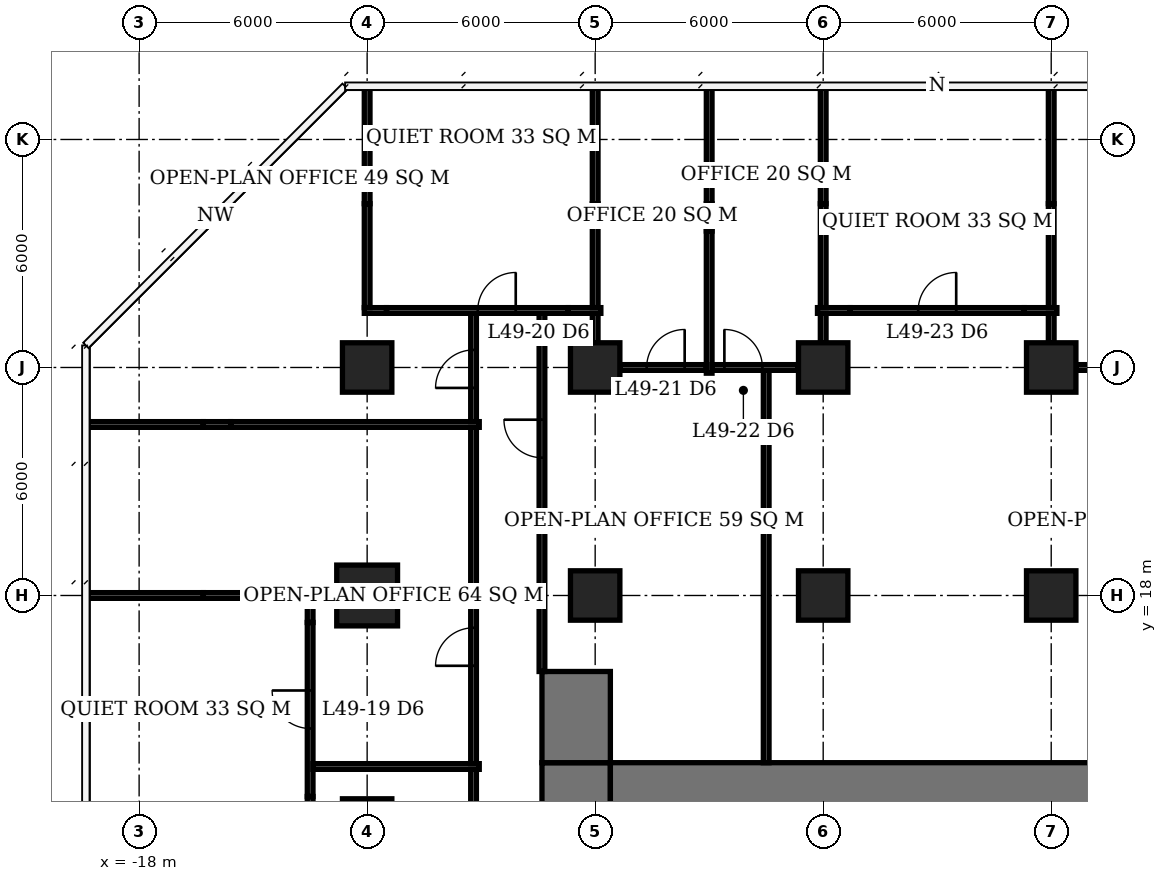
"""IFC4 building model, lengths in metres.
Left out: names, types, materials, properties, quantities, classifications, styles, units other than length and angle.
Written with IfcOpenShell. Run it as: python <this file> out.ifc"""

import sys

from ifc_helpers import new_model, si_unit, direction, frame, frame_2d, origin, origin_2d, place, context, subcontext, project, spatial, rectangle, extrude, element, fill, save


model = new_model("IFC4")
c1 = context("Model", 3, precision=1e-05, world=origin(), true_north=direction((0.0, 1.0)))
c2 = subcontext(c1, "Body", "Model", "MODEL_VIEW")
j1 = project(units=[si_unit("LENGTHUNIT", "METRE"), si_unit("PLANEANGLEUNIT", "RADIAN")], contexts=[c1])
p1 = place(None, origin())
s1 = spatial("IfcSite", under=j1, at=p1, CompositionType="ELEMENT")
p2 = place(p1, origin())
s2 = spatial("IfcBuilding", under=s1, at=p2, CompositionType="ELEMENT")
p3 = place(p2, frame((0.0, 0.0, 200.6)))
s3 = spatial("IfcBuildingStorey", under=s2, at=p3, CompositionType="ELEMENT", Elevation=200.6)
p4 = place(p3, frame((-12.0, 12.0, 0.0), z_axis=(0.0, 0.0, 1.0), x_axis=(1.0, 0.0, 0.0)))
e1 = element("IfcColumn", 1, at=p4, inside=s3, PredefinedType="COLUMN", context=c2, shape_type="SweptSolid", body=[
    extrude(rectangle(XDim=1.3, YDim=1.3, at=origin_2d()), origin(), (0.0, 0.0, 1.0), 3.9),
])
p5 = place(p3, frame((-12.0, 18.0, 0.0), z_axis=(0.0, 0.0, 1.0), x_axis=(1.0, 0.0, 0.0)))
e2 = element("IfcColumn", 2, at=p5, inside=s3, PredefinedType="COLUMN", context=c2, shape_type="SweptSolid", body=[
    extrude(rectangle(XDim=1.6, YDim=1.6, at=origin_2d()), origin(), (0.0, 0.0, 1.0), 3.9),
])
for number, where, z_axis, x_axis in (
    (3, (-12.0, 24.0, 0.0), (0.0, 0.0, 1.0), (1.0, 0.0, 0.0)),
    (4, (-6.0, 18.0, 0.0), (0.0, 0.0, 1.0), (1.0, 0.0, 0.0)),
    (5, (-6.0, 24.0, 0.0), (0.0, 0.0, 1.0), (1.0, 0.0, 0.0)),
    (6, (0.0, 18.0, 0.0), (0.0, 0.0, 1.0), (1.0, 0.0, 0.0)),
    (7, (0.0, 24.0, 0.0), (0.0, 0.0, 1.0), (1.0, 0.0, 0.0)),
    (8, (6.0, 18.0, 0.0), (0.0, 0.0, 1.0), (1.0, 0.0, 0.0)),
    (9, (6.0, 24.0, 0.0), (0.0, 0.0, 1.0), (1.0, 0.0, 0.0)),
):
    element("IfcColumn", number, at=place(p3, frame(where, z_axis=z_axis, x_axis=x_axis)), inside=s3, PredefinedType="COLUMN", context=c2, shape_type="SweptSolid", body=[
        extrude(rectangle(XDim=1.3, YDim=1.3, at=origin_2d()), origin(), (0.0, 0.0, 1.0), 3.9),
    ])
p6 = place(p3, frame((-5.6, 12.6, 0.0), z_axis=(0.0, 0.0, 1.0), x_axis=(1.0, 0.0, 0.0)))
e10 = element("IfcWall", 10, at=p6, inside=s3, PredefinedType="SHEAR", context=c2, shape_type="SweptSolid", body=[
    extrude(rectangle(XDim=23.2, YDim=2.0, at=frame_2d((11.6, 0.0))), origin(), (0.0, 0.0, 1.0), 3.9),
])
p7 = place(p3, frame((-6.5, -7.6, 0.0), z_axis=(0.0, 0.0, 1.0), x_axis=(0.0, 1.0, 0.0)))
e11 = element("IfcWall", 11, at=p7, inside=s3, PredefinedType="SHEAR", context=c2, shape_type="SweptSolid", body=[
    extrude(rectangle(XDim=21.2, YDim=1.8, at=frame_2d((10.6, 0.0))), origin(), (0.0, 0.0, 1.0), 3.9),
])
p8 = place(p7, frame((7.8, 0.0, 0.0)))
e12 = element("IfcOpeningElement", 12, at=p8, cuts=e11, PredefinedType="OPENING", context=c2, shape_type="SweptSolid", body=[
    extrude(rectangle(XDim=1.8, YDim=2.4, at=frame_2d((0.9, 1.2))), frame((0.0, 0.91, 0.0), z_axis=(0.0, -1.0, 0.0), x_axis=(1.0, 0.0, 0.0)), (0.0, 0.0, 1.0), 1.82),
])
p9 = place(p3, frame((-6.5, 13.6, 0.0), z_axis=(0.0, 0.0, 1.0), x_axis=(0.0, 1.0, 0.0)))
e13 = element("IfcWall", 13, at=p9, inside=s3, PredefinedType="SHEAR", context=c2, shape_type="SweptSolid", body=[
    extrude(rectangle(XDim=2.4, YDim=1.8, at=frame_2d((1.2, 0.0))), origin(), (0.0, 0.0, 1.0), 3.9),
])
p10 = place(p3, frame((-19.4, 18.0, 0.0), z_axis=(0.0, 0.0, 1.0), x_axis=(1.0, 0.0, 0.0)))
e14 = element("IfcWall", 14, at=p10, inside=s3, PredefinedType="PARTITIONING", context=c2, shape_type="SweptSolid", body=[
    extrude(rectangle(XDim=3.09, YDim=0.15, at=frame_2d((1.545, 0.0))), origin(), (0.0, 0.0, 1.0), 3.65),
])
p11 = place(p3, frame((-16.31, 18.0, 0.0), z_axis=(0.0, 0.0, 1.0), x_axis=(1.0, 0.0, 0.0)))
e15 = element("IfcWall", 15, at=p11, inside=s3, PredefinedType="PARTITIONING", context=c2, shape_type="SweptSolid", body=[
    extrude(rectangle(XDim=2.885, YDim=0.15, at=frame_2d((1.442, 0.0))), origin(), (0.0, 0.0, 1.0), 2.65),
])
p12 = place(p3, frame((-5.34, 24.0, 0.0), z_axis=(0.0, 0.0, 1.0), x_axis=(1.0, 0.0, 0.0)))
e16 = element("IfcWall", 16, at=p12, inside=s3, PredefinedType="PARTITIONING", context=c2, shape_type="SweptSolid", body=[
    extrude(rectangle(XDim=2.265, YDim=0.15, at=frame_2d((1.133, 0.0))), origin(), (0.0, 0.0, 1.0), 3.65),
])
p13 = place(p12, frame((0.695, 0.0, 0.0)))
e17 = element("IfcOpeningElement", 17, at=p13, cuts=e16, PredefinedType="OPENING", context=c2, shape_type="SweptSolid", body=[
    extrude(rectangle(XDim=1.0, YDim=2.1, at=frame_2d((0.5, 1.05))), frame((0.0, 0.085, 0.0), z_axis=(0.0, -1.0, 0.0), x_axis=(1.0, 0.0, 0.0)), (0.0, 0.0, 1.0), 0.17),
])
p14 = place(p3, frame((-2.925, 24.0, 0.0), z_axis=(0.0, 0.0, 1.0), x_axis=(1.0, 0.0, 0.0)))
e18 = element("IfcWall", 18, at=p14, inside=s3, PredefinedType="PARTITIONING", context=c2, shape_type="SweptSolid", body=[
    extrude(rectangle(XDim=2.265, YDim=0.15, at=frame_2d((1.133, 0.0))), origin(), (0.0, 0.0, 1.0), 3.65),
])
p15 = place(p14, frame((0.325, 0.0, 0.0)))
e19 = element("IfcOpeningElement", 19, at=p15, cuts=e18, PredefinedType="OPENING", context=c2, shape_type="SweptSolid", body=[
    extrude(rectangle(XDim=1.0, YDim=2.1, at=frame_2d((0.5, 1.05))), frame((0.0, 0.085, 0.0), z_axis=(0.0, -1.0, 0.0), x_axis=(1.0, 0.0, 0.0)), (0.0, 0.0, 1.0), 0.17),
])
p16 = place(p3, frame((6.66, 24.0, 0.0), z_axis=(0.0, 0.0, 1.0), x_axis=(1.0, 0.0, 0.0)))
e20 = element("IfcWall", 20, at=p16, inside=s3, PredefinedType="PARTITIONING", context=c2, shape_type="SweptSolid", body=[
    extrude(rectangle(XDim=4.68, YDim=0.15, at=frame_2d((2.34, 0.0))), origin(), (0.0, 0.0, 1.0), 3.65),
])
p17 = place(p16, frame((1.84, 0.0, 0.0)))
e21 = element("IfcOpeningElement", 21, at=p17, cuts=e20, PredefinedType="OPENING", context=c2, shape_type="SweptSolid", body=[
    extrude(rectangle(XDim=1.0, YDim=2.1, at=frame_2d((0.5, 1.05))), frame((0.0, 0.085, 0.0), z_axis=(0.0, -1.0, 0.0), x_axis=(1.0, 0.0, 0.0)), (0.0, 0.0, 1.0), 0.17),
])
p18 = place(p3, frame((-12.075, 25.5, 0.0), z_axis=(0.0, 0.0, 1.0), x_axis=(1.0, 0.0, 0.0)))
e22 = element("IfcWall", 22, at=p18, inside=s3, PredefinedType="PARTITIONING", context=c2, shape_type="SweptSolid", body=[
    extrude(rectangle(XDim=0.585, YDim=0.15, at=frame_2d((0.292, 0.0))), origin(), (0.0, 0.0, 1.0), 2.65),
])
p19 = place(p3, frame((-11.49, 25.5, 0.0), z_axis=(0.0, 0.0, 1.0), x_axis=(1.0, 0.0, 0.0)))
e23 = element("IfcWall", 23, at=p19, inside=s3, PredefinedType="PARTITIONING", context=c2, shape_type="SweptSolid", body=[
    extrude(rectangle(XDim=4.78, YDim=0.15, at=frame_2d((2.39, 0.0))), origin(), (0.0, 0.0, 1.0), 3.65),
])
p20 = place(p19, frame((2.4, 0.0, 0.0)))
e24 = element("IfcOpeningElement", 24, at=p20, cuts=e23, PredefinedType="OPENING", context=c2, shape_type="SweptSolid", body=[
    extrude(rectangle(XDim=1.0, YDim=2.1, at=frame_2d((0.5, 1.05))), frame((0.0, 0.085, 0.0), z_axis=(0.0, -1.0, 0.0), x_axis=(1.0, 0.0, 0.0)), (0.0, 0.0, 1.0), 0.17),
])
for number, where, z_axis, x_axis in (
    (25, (-6.71, 25.5, 0.0), (0.0, 0.0, 1.0), (1.0, 0.0, 0.0)),
    (26, (-0.15, 25.5, 0.0), (0.0, 0.0, 1.0), (1.0, 0.0, 0.0)),
):
    element("IfcWall", number, at=place(p3, frame(where, z_axis=z_axis, x_axis=x_axis)), inside=s3, PredefinedType="PARTITIONING", context=c2, shape_type="SweptSolid", body=[
        extrude(rectangle(XDim=0.86, YDim=0.15, at=frame_2d((0.43, 0.0))), origin(), (0.0, 0.0, 1.0), 2.65),
    ])
p21 = place(p3, frame((0.71, 25.5, 0.0), z_axis=(0.0, 0.0, 1.0), x_axis=(1.0, 0.0, 0.0)))
e27 = element("IfcWall", 27, at=p21, inside=s3, PredefinedType="PARTITIONING", context=c2, shape_type="SweptSolid", body=[
    extrude(rectangle(XDim=4.58, YDim=0.15, at=frame_2d((2.29, 0.0))), origin(), (0.0, 0.0, 1.0), 3.65),
])
p22 = place(p21, frame((1.79, 0.0, 0.0)))
e28 = element("IfcOpeningElement", 28, at=p22, cuts=e27, PredefinedType="OPENING", context=c2, shape_type="SweptSolid", body=[
    extrude(rectangle(XDim=1.0, YDim=2.1, at=frame_2d((0.5, 1.05))), frame((0.0, 0.085, 0.0), z_axis=(0.0, -1.0, 0.0), x_axis=(1.0, 0.0, 0.0)), (0.0, 0.0, 1.0), 0.17),
])
p23 = place(p3, frame((5.29, 25.5, 0.0), z_axis=(0.0, 0.0, 1.0), x_axis=(1.0, 0.0, 0.0)))
e29 = element("IfcWall", 29, at=p23, inside=s3, PredefinedType="PARTITIONING", context=c2, shape_type="SweptSolid", body=[
    extrude(rectangle(XDim=0.86, YDim=0.15, at=frame_2d((0.43, 0.0))), origin(), (0.0, 0.0, 1.0), 2.65),
])
p24 = place(p3, frame((-13.5, 12.075, 0.0), z_axis=(0.0, 0.0, 1.0), x_axis=(0.0, 1.0, 0.0)))
e30 = element("IfcWall", 30, at=p24, inside=s3, PredefinedType="PARTITIONING", context=c2, shape_type="SweptSolid", body=[
    extrude(rectangle(XDim=0.635, YDim=0.15, at=frame_2d((0.317, 0.0))), origin(), (0.0, 0.0, 1.0), 2.65),
])
p25 = place(p3, frame((-13.5, 12.71, 0.0), z_axis=(0.0, 0.0, 1.0), x_axis=(0.0, 1.0, 0.0)))
e31 = element("IfcWall", 31, at=p25, inside=s3, PredefinedType="PARTITIONING", context=c2, shape_type="SweptSolid", body=[
    extrude(rectangle(XDim=4.58, YDim=0.15, at=frame_2d((2.29, 0.0))), origin(), (0.0, 0.0, 1.0), 3.65),
])
p26 = place(p25, frame((1.79, 0.0, 0.0)))
e32 = element("IfcOpeningElement", 32, at=p26, cuts=e31, PredefinedType="OPENING", context=c2, shape_type="SweptSolid", body=[
    extrude(rectangle(XDim=1.0, YDim=2.1, at=frame_2d((0.5, 1.05))), frame((0.0, 0.085, 0.0), z_axis=(0.0, -1.0, 0.0), x_axis=(1.0, 0.0, 0.0)), (0.0, 0.0, 1.0), 0.17),
])
p27 = place(p3, frame((-13.5, 17.29, 0.0), z_axis=(0.0, 0.0, 1.0), x_axis=(0.0, 1.0, 0.0)))
e33 = element("IfcWall", 33, at=p27, inside=s3, PredefinedType="PARTITIONING", context=c2, shape_type="SweptSolid", body=[
    extrude(rectangle(XDim=0.635, YDim=0.15, at=frame_2d((0.317, 0.0))), origin(), (0.0, 0.0, 1.0), 2.65),
])
p28 = place(p3, frame((-12.0, 25.575, 0.0), z_axis=(0.0, 0.0, 1.0), x_axis=(0.0, 1.0, 0.0)))
e34 = element("IfcWall", 34, at=p28, inside=s3, PredefinedType="PARTITIONING", context=c2, shape_type="SweptSolid", body=[
    extrude(rectangle(XDim=2.735, YDim=0.15, at=frame_2d((1.368, 0.0))), origin(), (0.0, 0.0, 1.0), 2.65),
])
p29 = place(p3, frame((-12.0, 28.31, 0.0), z_axis=(0.0, 0.0, 1.0), x_axis=(0.0, 1.0, 0.0)))
e35 = element("IfcWall", 35, at=p29, inside=s3, PredefinedType="PARTITIONING", context=c2, shape_type="SweptSolid", body=[
    extrude(rectangle(XDim=3.09, YDim=0.15, at=frame_2d((1.545, 0.0))), origin(), (0.0, 0.0, 1.0), 3.65),
])
p30 = place(p3, frame((-6.0, 24.65, 0.0), z_axis=(0.0, 0.0, 1.0), x_axis=(0.0, 1.0, 0.0)))
e36 = element("IfcWall", 36, at=p30, inside=s3, PredefinedType="PARTITIONING", context=c2, shape_type="SweptSolid", body=[
    extrude(rectangle(XDim=0.775, YDim=0.15, at=frame_2d((0.388, 0.0))), origin(), (0.0, 0.0, 1.0), 2.65),
])
p31 = place(p3, frame((-6.0, 25.575, 0.0), z_axis=(0.0, 0.0, 1.0), x_axis=(0.0, 1.0, 0.0)))
e37 = element("IfcWall", 37, at=p31, inside=s3, PredefinedType="PARTITIONING", context=c2, shape_type="SweptSolid", body=[
    extrude(rectangle(XDim=2.735, YDim=0.15, at=frame_2d((1.368, 0.0))), origin(), (0.0, 0.0, 1.0), 2.65),
])
p32 = place(p3, frame((-6.0, 28.31, 0.0), z_axis=(0.0, 0.0, 1.0), x_axis=(0.0, 1.0, 0.0)))
e38 = element("IfcWall", 38, at=p32, inside=s3, PredefinedType="PARTITIONING", context=c2, shape_type="SweptSolid", body=[
    extrude(rectangle(XDim=3.09, YDim=0.15, at=frame_2d((1.545, 0.0))), origin(), (0.0, 0.0, 1.0), 3.65),
])
p33 = place(p3, frame((-3.0, 23.85, 0.0), z_axis=(0.0, 0.0, 1.0), x_axis=(0.0, 1.0, 0.0)))
e39 = element("IfcWall", 39, at=p33, inside=s3, PredefinedType="PARTITIONING", context=c2, shape_type="SweptSolid", body=[
    extrude(rectangle(XDim=3.74, YDim=0.15, at=frame_2d((1.87, 0.0))), origin(), (0.0, 0.0, 1.0), 3.65),
])
p34 = place(p3, frame((-3.0, 27.59, 0.0), z_axis=(0.0, 0.0, 1.0), x_axis=(0.0, 1.0, 0.0)))
e40 = element("IfcWall", 40, at=p34, inside=s3, PredefinedType="PARTITIONING", context=c2, shape_type="SweptSolid", body=[
    extrude(rectangle(XDim=0.72, YDim=0.15, at=frame_2d((0.36, 0.0))), origin(), (0.0, 0.0, 1.0), 2.65),
])
p35 = place(p3, frame((-3.0, 28.31, 0.0), z_axis=(0.0, 0.0, 1.0), x_axis=(0.0, 1.0, 0.0)))
e41 = element("IfcWall", 41, at=p35, inside=s3, PredefinedType="PARTITIONING", context=c2, shape_type="SweptSolid", body=[
    extrude(rectangle(XDim=3.09, YDim=0.15, at=frame_2d((1.545, 0.0))), origin(), (0.0, 0.0, 1.0), 3.65),
])
p36 = place(p3, frame((0.0, 24.65, 0.0), z_axis=(0.0, 0.0, 1.0), x_axis=(0.0, 1.0, 0.0)))
e42 = element("IfcWall", 42, at=p36, inside=s3, PredefinedType="PARTITIONING", context=c2, shape_type="SweptSolid", body=[
    extrude(rectangle(XDim=0.775, YDim=0.15, at=frame_2d((0.388, 0.0))), origin(), (0.0, 0.0, 1.0), 2.65),
])
p37 = place(p3, frame((0.0, 25.575, 0.0), z_axis=(0.0, 0.0, 1.0), x_axis=(0.0, 1.0, 0.0)))
e43 = element("IfcWall", 43, at=p37, inside=s3, PredefinedType="PARTITIONING", context=c2, shape_type="SweptSolid", body=[
    extrude(rectangle(XDim=2.735, YDim=0.15, at=frame_2d((1.368, 0.0))), origin(), (0.0, 0.0, 1.0), 2.65),
])
p38 = place(p3, frame((0.0, 28.31, 0.0), z_axis=(0.0, 0.0, 1.0), x_axis=(0.0, 1.0, 0.0)))
e44 = element("IfcWall", 44, at=p38, inside=s3, PredefinedType="PARTITIONING", context=c2, shape_type="SweptSolid", body=[
    extrude(rectangle(XDim=3.04, YDim=0.15, at=frame_2d((1.52, 0.0))), origin(), (0.0, 0.0, 1.0), 3.65),
])
p39 = place(p3, frame((6.0, 24.65, 0.0), z_axis=(0.0, 0.0, 1.0), x_axis=(0.0, 1.0, 0.0)))
e45 = element("IfcWall", 45, at=p39, inside=s3, PredefinedType="PARTITIONING", context=c2, shape_type="SweptSolid", body=[
    extrude(rectangle(XDim=0.775, YDim=0.15, at=frame_2d((0.388, 0.0))), origin(), (0.0, 0.0, 1.0), 2.65),
])
p40 = place(p3, frame((6.0, 25.575, 0.0), z_axis=(0.0, 0.0, 1.0), x_axis=(0.0, 1.0, 0.0)))
e46 = element("IfcWall", 46, at=p40, inside=s3, PredefinedType="PARTITIONING", context=c2, shape_type="SweptSolid", body=[
    extrude(rectangle(XDim=2.735, YDim=0.15, at=frame_2d((1.368, 0.0))), origin(), (0.0, 0.0, 1.0), 2.65),
])
p41 = place(p3, frame((6.0, 28.31, 0.0), z_axis=(0.0, 0.0, 1.0), x_axis=(0.0, 1.0, 0.0)))
e47 = element("IfcWall", 47, at=p41, inside=s3, PredefinedType="PARTITIONING", context=c2, shape_type="SweptSolid", body=[
    extrude(rectangle(XDim=3.04, YDim=0.15, at=frame_2d((1.52, 0.0))), origin(), (0.0, 0.0, 1.0), 3.65),
])
p42 = place(p3, frame((-19.4, 22.5, 0.0), z_axis=(0.0, 0.0, 1.0), x_axis=(1.0, 0.0, 0.0)))
e48 = element("IfcWall", 48, at=p42, inside=s3, PredefinedType="PARTITIONING", context=c2, shape_type="SweptSolid", body=[
    extrude(rectangle(XDim=3.09, YDim=0.15, at=frame_2d((1.545, 0.0))), origin(), (0.0, 0.0, 1.0), 3.65),
])
p43 = place(p3, frame((-16.31, 22.5, 0.0), z_axis=(0.0, 0.0, 1.0), x_axis=(1.0, 0.0, 0.0)))
e49 = element("IfcWall", 49, at=p43, inside=s3, PredefinedType="PARTITIONING", context=c2, shape_type="SweptSolid", body=[
    extrude(rectangle(XDim=0.72, YDim=0.15, at=frame_2d((0.36, 0.0))), origin(), (0.0, 0.0, 1.0), 2.65),
])
p44 = place(p3, frame((-15.59, 22.5, 0.0), z_axis=(0.0, 0.0, 1.0), x_axis=(1.0, 0.0, 0.0)))
e50 = element("IfcWall", 50, at=p44, inside=s3, PredefinedType="PARTITIONING", context=c2, shape_type="SweptSolid", body=[
    extrude(rectangle(XDim=6.54, YDim=0.15, at=frame_2d((3.27, 0.0))), origin(), (0.0, 0.0, 1.0), 3.65),
])
p45 = place(p3, frame((-13.425, 13.5, 0.0), z_axis=(0.0, 0.0, 1.0), x_axis=(1.0, 0.0, 0.0)))
e51 = element("IfcWall", 51, at=p45, inside=s3, PredefinedType="PARTITIONING", context=c2, shape_type="SweptSolid", body=[
    extrude(rectangle(XDim=4.375, YDim=0.15, at=frame_2d((2.188, 0.0))), origin(), (0.0, 0.0, 1.0), 3.65),
])
p46 = place(p3, frame((-9.2, 1.575, 0.0), z_axis=(0.0, 0.0, 1.0), x_axis=(0.0, 1.0, 0.0)))
e52 = element("IfcWall", 52, at=p46, inside=s3, PredefinedType="PARTITIONING", context=c2, shape_type="SweptSolid", body=[
    extrude(rectangle(XDim=11.85, YDim=0.15, at=frame_2d((5.925, 0.0))), origin(), (0.0, 0.0, 1.0), 3.65),
])
p47 = place(p46, frame((3.625, 0.0, 0.0)))
e53 = element("IfcOpeningElement", 53, at=p47, cuts=e52, PredefinedType="OPENING", context=c2, shape_type="SweptSolid", body=[
    extrude(rectangle(XDim=1.0, YDim=2.1, at=frame_2d((0.5, 1.05))), frame((0.0, 0.085, 0.0), z_axis=(0.0, -1.0, 0.0), x_axis=(1.0, 0.0, 0.0)), (0.0, 0.0, 1.0), 0.17),
])
p48 = place(p3, frame((-9.2, 13.575, 0.0), z_axis=(0.0, 0.0, 1.0), x_axis=(0.0, 1.0, 0.0)))
e54 = element("IfcWall", 54, at=p48, inside=s3, PredefinedType="PARTITIONING", context=c2, shape_type="SweptSolid", body=[
    extrude(rectangle(XDim=8.85, YDim=0.15, at=frame_2d((4.425, 0.0))), origin(), (0.0, 0.0, 1.0), 3.65),
])
p49 = place(p48, frame((2.575, 0.0, 0.0)))
e55 = element("IfcOpeningElement", 55, at=p49, cuts=e54, PredefinedType="OPENING", context=c2, shape_type="SweptSolid", body=[
    extrude(rectangle(XDim=1.0, YDim=2.1, at=frame_2d((0.5, 1.05))), frame((0.0, 0.085, 0.0), z_axis=(0.0, -1.0, 0.0), x_axis=(1.0, 0.0, 0.0)), (0.0, 0.0, 1.0), 0.17),
])
p50 = place(p3, frame((-9.2, 22.575, 0.0), z_axis=(0.0, 0.0, 1.0), x_axis=(0.0, 1.0, 0.0)))
e56 = element("IfcWall", 56, at=p50, inside=s3, PredefinedType="PARTITIONING", context=c2, shape_type="SweptSolid", body=[
    extrude(rectangle(XDim=2.85, YDim=0.15, at=frame_2d((1.425, 0.0))), origin(), (0.0, 0.0, 1.0), 3.65),
])
p51 = place(p50, frame((0.887, 0.0, 0.0)))
e57 = element("IfcOpeningElement", 57, at=p51, cuts=e56, PredefinedType="OPENING", context=c2, shape_type="SweptSolid", body=[
    extrude(rectangle(XDim=1.0, YDim=2.1, at=frame_2d((0.5, 1.05))), frame((0.0, 0.085, 0.0), z_axis=(0.0, -1.0, 0.0), x_axis=(1.0, 0.0, 0.0)), (0.0, 0.0, 1.0), 0.17),
])
p52 = place(p3, frame((-7.4, 16.0, 0.0), z_axis=(0.0, 0.0, 1.0), x_axis=(0.0, 1.0, 0.0)))
e58 = element("IfcWall", 58, at=p52, inside=s3, PredefinedType="PARTITIONING", context=c2, shape_type="SweptSolid", body=[
    extrude(rectangle(XDim=9.425, YDim=0.15, at=frame_2d((4.712, 0.0))), origin(), (0.0, 0.0, 1.0), 3.65),
])
p53 = place(p52, frame((5.626, 0.0, 0.0)))
e59 = element("IfcOpeningElement", 59, at=p53, cuts=e58, PredefinedType="OPENING", context=c2, shape_type="SweptSolid", body=[
    extrude(rectangle(XDim=1.0, YDim=2.1, at=frame_2d((0.5, 1.05))), frame((0.0, 0.085, 0.0), z_axis=(0.0, -1.0, 0.0), x_axis=(1.0, 0.0, 0.0)), (0.0, 0.0, 1.0), 0.17),
])
p54 = place(p3, frame((-1.5, 13.6, 0.0), z_axis=(0.0, 0.0, 1.0), x_axis=(0.0, 1.0, 0.0)))
e60 = element("IfcWall", 60, at=p54, inside=s3, PredefinedType="PARTITIONING", context=c2, shape_type="SweptSolid", body=[
    extrude(rectangle(XDim=10.325, YDim=0.15, at=frame_2d((5.163, 0.0))), origin(), (0.0, 0.0, 1.0), 3.65),
])
p55 = place(p26, origin())
e61 = element("IfcDoor", 61, at=p55, inside=s3, OperationType="SINGLE_SWING_RIGHT", PredefinedType="DOOR", context=c2, shape_type="SweptSolid", body=[
    extrude(rectangle(XDim=1.0, YDim=2.1, at=frame_2d((0.5, 1.05))), frame((0.0, 0.025, 0.0), z_axis=(0.0, -1.0, 0.0), x_axis=(1.0, 0.0, 0.0)), (0.0, 0.0, 1.0), 0.05),
])
fill(e32, e61)
p56 = place(p20, origin())
e62 = element("IfcDoor", 62, at=p56, inside=s3, OperationType="SINGLE_SWING_RIGHT", PredefinedType="DOOR", context=c2, shape_type="SweptSolid", body=[
    extrude(rectangle(XDim=1.0, YDim=2.1, at=frame_2d((0.5, 1.05))), frame((0.0, 0.025, 0.0), z_axis=(0.0, -1.0, 0.0), x_axis=(1.0, 0.0, 0.0)), (0.0, 0.0, 1.0), 0.05),
])
fill(e24, e62)
p57 = place(p13, origin())
e63 = element("IfcDoor", 63, at=p57, inside=s3, OperationType="SINGLE_SWING_RIGHT", PredefinedType="DOOR", context=c2, shape_type="SweptSolid", body=[
    extrude(rectangle(XDim=1.0, YDim=2.1, at=frame_2d((0.5, 1.05))), frame((0.0, 0.025, 0.0), z_axis=(0.0, -1.0, 0.0), x_axis=(1.0, 0.0, 0.0)), (0.0, 0.0, 1.0), 0.05),
])
fill(e17, e63)
p58 = place(p15, origin())
e64 = element("IfcDoor", 64, at=p58, inside=s3, OperationType="SINGLE_SWING_LEFT", PredefinedType="DOOR", context=c2, shape_type="SweptSolid", body=[
    extrude(rectangle(XDim=1.0, YDim=2.1, at=frame_2d((0.5, 1.05))), frame((0.0, 0.025, 0.0), z_axis=(0.0, -1.0, 0.0), x_axis=(1.0, 0.0, 0.0)), (0.0, 0.0, 1.0), 0.05),
])
fill(e19, e64)
p59 = place(p22, origin())
e65 = element("IfcDoor", 65, at=p59, inside=s3, OperationType="SINGLE_SWING_RIGHT", PredefinedType="DOOR", context=c2, shape_type="SweptSolid", body=[
    extrude(rectangle(XDim=1.0, YDim=2.1, at=frame_2d((0.5, 1.05))), frame((0.0, 0.025, 0.0), z_axis=(0.0, -1.0, 0.0), x_axis=(1.0, 0.0, 0.0)), (0.0, 0.0, 1.0), 0.05),
])
fill(e28, e65)
p60 = place(p49, origin())
e66 = element("IfcDoor", 66, at=p60, inside=s3, OperationType="SINGLE_SWING_LEFT", PredefinedType="DOOR", context=c2, shape_type="SweptSolid", body=[
    extrude(rectangle(XDim=1.0, YDim=2.1, at=frame_2d((0.5, 1.05))), frame((0.0, 0.025, 0.0), z_axis=(0.0, -1.0, 0.0), x_axis=(1.0, 0.0, 0.0)), (0.0, 0.0, 1.0), 0.05),
])
fill(e55, e66)
p61 = place(p53, origin())
e67 = element("IfcDoor", 67, at=p61, inside=s3, OperationType="SINGLE_SWING_RIGHT", PredefinedType="DOOR", context=c2, shape_type="SweptSolid", body=[
    extrude(rectangle(XDim=1.0, YDim=2.1, at=frame_2d((0.5, 1.05))), frame((0.0, 0.025, 0.0), z_axis=(0.0, -1.0, 0.0), x_axis=(1.0, 0.0, 0.0)), (0.0, 0.0, 1.0), 0.05),
])
fill(e59, e67)
p62 = place(p51, origin())
e68 = element("IfcDoor", 68, at=p62, inside=s3, OperationType="SINGLE_SWING_LEFT", PredefinedType="DOOR", context=c2, shape_type="SweptSolid", body=[
    extrude(rectangle(XDim=1.0, YDim=2.1, at=frame_2d((0.5, 1.05))), frame((0.0, 0.025, 0.0), z_axis=(0.0, -1.0, 0.0), x_axis=(1.0, 0.0, 0.0)), (0.0, 0.0, 1.0), 0.05),
])
fill(e57, e68)
save(model, sys.argv[1])
